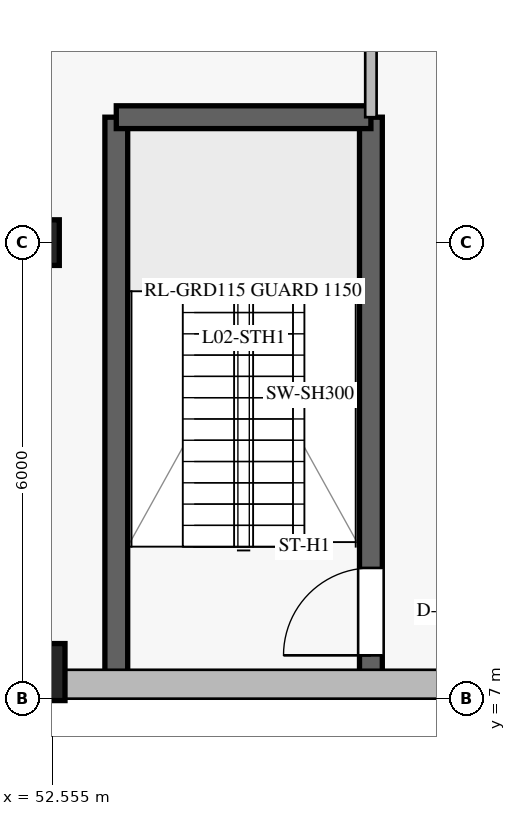
"""IFC4 building model, lengths in metres.
Left out: names, types, materials, properties, quantities, classifications, styles, units other than length and angle.
Written with IfcOpenShell. Run it as: python <this file> out.ifc"""

import sys

from ifc_helpers import new_model, si_unit, direction, frame, frame_2d, origin, origin_2d, place, context, subcontext, project, spatial, rectangle, extrude, element, fill, save


model = new_model("IFC4")
c1 = context("Model", 3, precision=1e-05, world=origin(), true_north=direction((0.0, 1.0)))
c2 = subcontext(c1, "Body", "Model", "MODEL_VIEW")
j1 = project(units=[si_unit("LENGTHUNIT", "METRE"), si_unit("PLANEANGLEUNIT", "RADIAN")], contexts=[c1])
p1 = place(None, origin())
s1 = spatial("IfcSite", under=j1, at=p1, CompositionType="ELEMENT")
p2 = place(p1, origin())
s2 = spatial("IfcBuilding", under=s1, at=p2, CompositionType="ELEMENT")
p3 = place(p2, frame((0.0, 0.0, 9.8)))
s3 = spatial("IfcBuildingStorey", under=s2, at=p3, CompositionType="ELEMENT", Elevation=9.8)
p4 = place(p3, frame((56.75, 7.35, 0.0), z_axis=(0.0, 0.0, 1.0), x_axis=(0.0, 1.0, 0.0)))
e1 = element("IfcWall", 1, at=p4, inside=s3, PredefinedType="SOLIDWALL", context=c2, shape_type="SweptSolid", body=[
    extrude(rectangle(XDim=7.3, YDim=0.3, at=frame_2d((3.65, 0.0))), origin(), (0.0, 0.0, 1.0), 4.34),
])
p5 = place(p4, frame((0.22, 0.0, 0.0)))
e2 = element("IfcOpeningElement", 2, at=p5, cuts=e1, PredefinedType="OPENING", context=c2, shape_type="SweptSolid", body=[
    extrude(rectangle(XDim=1.15, YDim=2.2, at=frame_2d((0.575, 1.1))), frame((0.0, 0.16, 0.0), z_axis=(0.0, -1.0, 0.0), x_axis=(1.0, 0.0, 0.0)), (0.0, 0.0, 1.0), 0.32),
])
p6 = place(p3, frame((53.4, 7.35, 0.0), z_axis=(0.0, 0.0, 1.0), x_axis=(0.0, 1.0, 0.0)))
e3 = element("IfcWall", 3, at=p6, inside=s3, PredefinedType="SOLIDWALL", context=c2, shape_type="SweptSolid", body=[
    extrude(rectangle(XDim=7.3, YDim=0.3, at=frame_2d((3.65, 0.0))), origin(), (0.0, 0.0, 1.0), 4.34),
])
p7 = place(p3, frame((53.4, 14.65, 0.0), z_axis=(0.0, 0.0, 1.0), x_axis=(1.0, 0.0, 0.0)))
e4 = element("IfcWall", 4, at=p7, inside=s3, PredefinedType="SOLIDWALL", context=c2, shape_type="SweptSolid", body=[
    extrude(rectangle(XDim=3.35, YDim=0.3, at=frame_2d((1.675, 0.0))), origin(), (0.0, 0.0, 1.0), 4.34),
])
p8 = place(p3, frame((52.35, 7.35, 0.0), z_axis=(0.0, 0.0, 1.0), x_axis=(1.0, 0.0, 0.0)))
e5 = element("IfcColumn", 5, at=p8, inside=s3, PredefinedType="COLUMN", context=c2, shape_type="SweptSolid", body=[
    extrude(rectangle(XDim=0.75, YDim=0.75, at=origin_2d()), origin(), (0.0, 0.0, 1.0), 4.6),
])
p9 = place(p3, frame((52.35, 13.0, 0.0), z_axis=(0.0, 0.0, 1.0), x_axis=(1.0, 0.0, 0.0)))
e6 = element("IfcColumn", 6, at=p9, inside=s3, PredefinedType="COLUMN", context=c2, shape_type="SweptSolid", body=[
    extrude(rectangle(XDim=0.6, YDim=0.6, at=origin_2d()), origin(), (0.0, 0.0, 1.0), 4.6),
])
p10 = place(p3, frame((75.0, 7.19, 0.0), z_axis=(0.0, 0.0, 1.0), x_axis=(-1.0, 0.0, 0.0)))
e7 = element("IfcWall", 7, at=p10, inside=s3, PredefinedType="STANDARD", context=c2, shape_type="SweptSolid", body=[
    extrude(rectangle(XDim=23.0, YDim=0.38, at=frame_2d((11.5, 0.0))), origin(), (0.0, 0.0, 1.0), 4.34),
])
p11 = place(p10, frame((10.3, 0.0, 0.95)))
e8 = element("IfcOpeningElement", 8, at=p11, cuts=e7, PredefinedType="OPENING", context=c2, shape_type="SweptSolid", body=[
    extrude(rectangle(XDim=2.4, YDim=1.8, at=frame_2d((1.2, 0.9))), frame((0.0, 0.2, 0.0), z_axis=(0.0, -1.0, 0.0), x_axis=(1.0, 0.0, 0.0)), (0.0, 0.0, 1.0), 0.4),
])
p12 = place(p3, frame((56.75, 14.65, 0.0), z_axis=(0.0, 0.0, 1.0), x_axis=(0.0, 1.0, 0.0)))
e9 = element("IfcWall", 9, at=p12, inside=s3, PredefinedType="PARTITIONING", context=c2, shape_type="SweptSolid", body=[
    extrude(rectangle(XDim=20.7, YDim=0.15, at=frame_2d((10.35, 0.0))), origin(), (0.0, 0.0, 1.0), 4.34),
])
p13 = place(p12, frame((9.675, 0.0, 0.0)))
e10 = element("IfcOpeningElement", 10, at=p13, cuts=e9, PredefinedType="OPENING", context=c2, shape_type="SweptSolid", body=[
    extrude(rectangle(XDim=1.35, YDim=2.2, at=frame_2d((0.675, 1.1))), frame((0.0, 0.085, 0.0), z_axis=(0.0, -1.0, 0.0), x_axis=(1.0, 0.0, 0.0)), (0.0, 0.0, 1.0), 0.17),
])
p14 = place(p5, origin())
e11 = element("IfcDoor", 11, at=p14, inside=s3, OperationType="SINGLE_SWING_LEFT", PredefinedType="DOOR", context=c2, shape_type="SweptSolid", body=[
    extrude(rectangle(XDim=1.15, YDim=2.2, at=frame_2d((0.575, 1.1))), frame((0.0, 0.025, 0.0), z_axis=(0.0, -1.0, 0.0), x_axis=(1.0, 0.0, 0.0)), (0.0, 0.0, 1.0), 0.05),
])
fill(e2, e11)
save(model, sys.argv[1])
